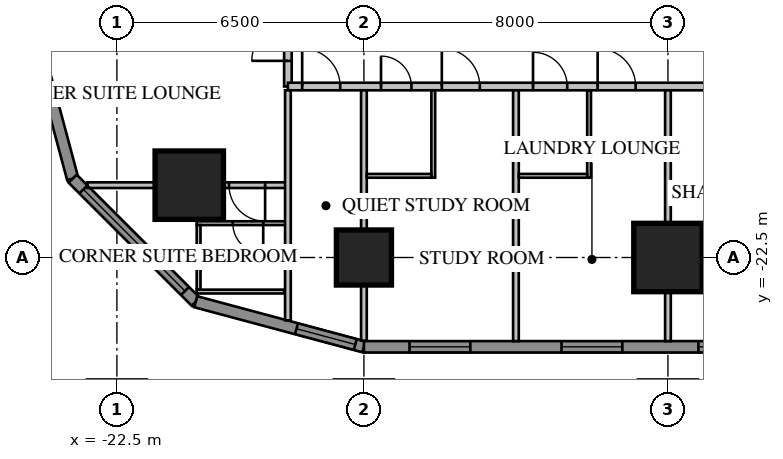
"""IFC4 building model, lengths in metres.
Left out: names, types, materials, properties, quantities, classifications, styles, units other than length and angle.
Written with IfcOpenShell. Run it as: python <this file> out.ifc"""

import sys

from ifc_helpers import new_model, si_unit, direction, frame, frame_2d, origin, origin_2d, place, context, subcontext, project, spatial, rectangle, extrude, element, fill, save


model = new_model("IFC4")
c1 = context("Model", 3, precision=1e-05, world=origin(), true_north=direction((0.0, 1.0)))
c2 = subcontext(c1, "Body", "Model", "MODEL_VIEW")
j1 = project(units=[si_unit("LENGTHUNIT", "METRE"), si_unit("PLANEANGLEUNIT", "RADIAN")], contexts=[c1])
p1 = place(None, origin())
s1 = spatial("IfcSite", under=j1, at=p1, CompositionType="ELEMENT")
p2 = place(p1, origin())
s2 = spatial("IfcBuilding", under=s1, at=p2, CompositionType="ELEMENT")
p3 = place(p2, frame((0.0, 0.0, 35.25)))
s3 = spatial("IfcBuildingStorey", under=s2, at=p3, CompositionType="ELEMENT", Elevation=35.25)
p4 = place(p3, frame((-20.596, -20.596, 0.0), z_axis=(0.0, 0.0, 1.0), x_axis=(1.0, 0.0, 0.0)))
e1 = element("IfcColumn", 1, at=p4, inside=s3, PredefinedType="COLUMN", context=c2, shape_type="SweptSolid", body=[
    extrude(rectangle(XDim=1.8, YDim=1.8, at=origin_2d()), origin(), (0.0, 0.0, 1.0), 3.85),
])
p5 = place(p3, frame((-16.0, -22.5, 0.0), z_axis=(0.0, 0.0, 1.0), x_axis=(1.0, 0.0, 0.0)))
e2 = element("IfcColumn", 2, at=p5, inside=s3, PredefinedType="COLUMN", context=c2, shape_type="SweptSolid", body=[
    extrude(rectangle(XDim=1.45, YDim=1.45, at=origin_2d()), origin(), (0.0, 0.0, 1.0), 3.85),
])
p6 = place(p3, frame((-8.0, -22.5, 0.0), z_axis=(0.0, 0.0, 1.0), x_axis=(1.0, 0.0, 0.0)))
e3 = element("IfcColumn", 3, at=p6, inside=s3, PredefinedType="COLUMN", context=c2, shape_type="SweptSolid", body=[
    extrude(rectangle(XDim=1.8, YDim=1.8, at=origin_2d()), origin(), (0.0, 0.0, 1.0), 3.85),
])
p7 = place(p3, frame((-24.85, -16.0, 0.0), z_axis=(0.0, 0.0, 1.0), x_axis=(0.258839972501, -0.965920218567, 0.0)))
e4 = element("IfcWall", 4, at=p7, inside=s3, PredefinedType="SOLIDWALL", context=c2, shape_type="SweptSolid", body=[
    extrude(rectangle(XDim=4.581, YDim=0.3, at=frame_2d((2.291, 0.0))), origin(), (0.0, 0.0, 1.0), 3.65),
])
p8 = place(p3, frame((-23.664, -20.425, 0.0), z_axis=(0.0, 0.0, 1.0), x_axis=(0.707106781187, -0.707106781187, 0.0)))
e5 = element("IfcWall", 5, at=p8, inside=s3, PredefinedType="SOLIDWALL", context=c2, shape_type="SweptSolid", body=[
    extrude(rectangle(XDim=4.581, YDim=0.3, at=frame_2d((2.291, 0.0))), origin(), (0.0, 0.0, 1.0), 3.65),
])
p9 = place(p8, frame((0.4, 0.0, 0.75)))
e6 = element("IfcOpeningElement", 6, at=p9, cuts=e5, PredefinedType="OPENING", context=c2, shape_type="SweptSolid", body=[
    extrude(rectangle(XDim=3.781, YDim=1.8, at=frame_2d((1.891, 0.9))), frame((0.0, 0.17, 0.0), z_axis=(0.0, -1.0, 0.0), x_axis=(1.0, 0.0, 0.0)), (0.0, 0.0, 1.0), 0.34),
])
p10 = place(p3, frame((-20.425, -23.664, 0.0), z_axis=(0.0, 0.0, 1.0), x_axis=(0.965920218567, -0.258839972501, 0.0)))
e7 = element("IfcWall", 7, at=p10, inside=s3, PredefinedType="SOLIDWALL", context=c2, shape_type="SweptSolid", body=[
    extrude(rectangle(XDim=4.581, YDim=0.3, at=frame_2d((2.291, 0.0))), origin(), (0.0, 0.0, 1.0), 3.65),
])
p11 = place(p10, frame((2.746, 0.0, 0.75)))
e8 = element("IfcOpeningElement", 8, at=p11, cuts=e7, PredefinedType="OPENING", context=c2, shape_type="SweptSolid", body=[
    extrude(rectangle(XDim=1.6, YDim=1.8, at=frame_2d((0.8, 0.9))), frame((0.0, 0.17, 0.0), z_axis=(0.0, -1.0, 0.0), x_axis=(1.0, 0.0, 0.0)), (0.0, 0.0, 1.0), 0.34),
])
p12 = place(p3, frame((-16.0, -24.85, 0.0), z_axis=(0.0, 0.0, 1.0), x_axis=(1.0, 0.0, 0.0)))
e9 = element("IfcWall", 9, at=p12, inside=s3, PredefinedType="SOLIDWALL", context=c2, shape_type="SweptSolid", body=[
    extrude(rectangle(XDim=32.0, YDim=0.3, at=frame_2d((16.0, 0.0))), origin(), (0.0, 0.0, 1.0), 3.65),
])
p13 = place(p12, frame((1.2, 0.0, 0.75)))
e10 = element("IfcOpeningElement", 10, at=p13, cuts=e9, PredefinedType="OPENING", context=c2, shape_type="SweptSolid", body=[
    extrude(rectangle(XDim=1.6, YDim=1.8, at=frame_2d((0.8, 0.9))), frame((0.0, 0.17, 0.0), z_axis=(0.0, -1.0, 0.0), x_axis=(1.0, 0.0, 0.0)), (0.0, 0.0, 1.0), 0.34),
])
p14 = place(p12, frame((5.2, 0.0, 0.75)))
e11 = element("IfcOpeningElement", 11, at=p14, cuts=e9, PredefinedType="OPENING", context=c2, shape_type="SweptSolid", body=[
    extrude(rectangle(XDim=1.6, YDim=1.8, at=frame_2d((0.8, 0.9))), frame((0.0, 0.17, 0.0), z_axis=(0.0, -1.0, 0.0), x_axis=(1.0, 0.0, 0.0)), (0.0, 0.0, 1.0), 0.34),
])
p15 = place(p12, frame((17.2, 0.0, 0.75)))
e12 = element("IfcOpeningElement", 12, at=p15, cuts=e9, PredefinedType="OPENING", context=c2, shape_type="SweptSolid", body=[
    extrude(rectangle(XDim=1.6, YDim=1.8, at=frame_2d((0.8, 0.9))), frame((0.0, 0.17, 0.0), z_axis=(0.0, -1.0, 0.0), x_axis=(1.0, 0.0, 0.0)), (0.0, 0.0, 1.0), 0.34),
])
p16 = place(p12, frame((21.2, 0.0, 0.75)))
e13 = element("IfcOpeningElement", 13, at=p16, cuts=e9, PredefinedType="OPENING", context=c2, shape_type="SweptSolid", body=[
    extrude(rectangle(XDim=1.6, YDim=1.8, at=frame_2d((0.8, 0.9))), frame((0.0, 0.17, 0.0), z_axis=(0.0, -1.0, 0.0), x_axis=(1.0, 0.0, 0.0)), (0.0, 0.0, 1.0), 0.34),
])
p17 = place(p12, frame((25.2, 0.0, 0.75)))
e14 = element("IfcOpeningElement", 14, at=p17, cuts=e9, PredefinedType="OPENING", context=c2, shape_type="SweptSolid", body=[
    extrude(rectangle(XDim=1.6, YDim=1.8, at=frame_2d((0.8, 0.9))), frame((0.0, 0.17, 0.0), z_axis=(0.0, -1.0, 0.0), x_axis=(1.0, 0.0, 0.0)), (0.0, 0.0, 1.0), 0.34),
])
p18 = place(p12, frame((29.2, 0.0, 0.75)))
e15 = element("IfcOpeningElement", 15, at=p18, cuts=e9, PredefinedType="OPENING", context=c2, shape_type="SweptSolid", body=[
    extrude(rectangle(XDim=1.6, YDim=1.8, at=frame_2d((0.8, 0.9))), frame((0.0, 0.17, 0.0), z_axis=(0.0, -1.0, 0.0), x_axis=(1.0, 0.0, 0.0)), (0.0, 0.0, 1.0), 0.34),
])
p19 = place(p12, frame((8.8, 0.0, 0.75)))
e16 = element("IfcOpeningElement", 16, at=p19, cuts=e9, PredefinedType="OPENING", context=c2, shape_type="SweptSolid", body=[
    extrude(rectangle(XDim=2.4, YDim=1.8, at=frame_2d((1.2, 0.9))), frame((0.0, 0.17, 0.0), z_axis=(0.0, -1.0, 0.0), x_axis=(1.0, 0.0, 0.0)), (0.0, 0.0, 1.0), 0.34),
])
p20 = place(p12, frame((13.812, 0.0, 0.0)))
e17 = element("IfcOpeningElement", 17, at=p20, cuts=e9, PredefinedType="OPENING", context=c2, shape_type="SweptSolid", body=[
    extrude(rectangle(XDim=1.0, YDim=2.4, at=frame_2d((0.5, 1.2))), frame((0.0, 0.17, 0.0), z_axis=(0.0, -1.0, 0.0), x_axis=(1.0, 0.0, 0.0)), (0.0, 0.0, 1.0), 0.34),
])
p21 = place(p3, frame((-18.0, 18.0, 0.0), z_axis=(0.0, 0.0, 1.0), x_axis=(0.0, -1.0, 0.0)))
e18 = element("IfcWall", 18, at=p21, inside=s3, PredefinedType="PARTITIONING", context=c2, shape_type="SweptSolid", body=[
    extrude(rectangle(XDim=36.0, YDim=0.2, at=frame_2d((18.0, 0.0))), origin(), (0.0, 0.0, 1.0), 3.65),
])
p22 = place(p21, frame((10.4, 0.0, 0.0)))
e19 = element("IfcOpeningElement", 19, at=p22, cuts=e18, PredefinedType="OPENING", context=c2, shape_type="SweptSolid", body=[
    extrude(rectangle(XDim=1.0, YDim=2.1, at=frame_2d((0.5, 1.05))), frame((0.0, 0.12, 0.0), z_axis=(0.0, -1.0, 0.0), x_axis=(1.0, 0.0, 0.0)), (0.0, 0.0, 1.0), 0.24),
])
p23 = place(p21, frame((0.375, 0.0, 0.0)))
e20 = element("IfcOpeningElement", 20, at=p23, cuts=e18, PredefinedType="OPENING", context=c2, shape_type="SweptSolid", body=[
    extrude(rectangle(XDim=1.0, YDim=2.1, at=frame_2d((0.5, 1.05))), frame((0.0, 0.12, 0.0), z_axis=(0.0, -1.0, 0.0), x_axis=(1.0, 0.0, 0.0)), (0.0, 0.0, 1.0), 0.24),
])
p24 = place(p21, frame((34.375, 0.0, 0.0)))
e21 = element("IfcOpeningElement", 21, at=p24, cuts=e18, PredefinedType="OPENING", context=c2, shape_type="SweptSolid", body=[
    extrude(rectangle(XDim=0.95, YDim=2.1, at=frame_2d((0.475, 1.05))), frame((0.0, 0.12, 0.0), z_axis=(0.0, -1.0, 0.0), x_axis=(1.0, 0.0, 0.0)), (0.0, 0.0, 1.0), 0.24),
])
p25 = place(p3, frame((-18.065, -21.596, 0.0), z_axis=(0.0, 0.0, 1.0), x_axis=(-1.0, 0.0, 0.0)))
e22 = element("IfcWall", 22, at=p25, inside=s3, PredefinedType="PARTITIONING", context=c2, shape_type="SweptSolid", body=[
    extrude(rectangle(XDim=2.335, YDim=0.1, at=frame_2d((1.167, 0.0))), origin(), (0.0, 0.0, 1.0), 3.65),
])
p26 = place(p25, frame((0.585, 0.0, 0.0)))
e23 = element("IfcOpeningElement", 23, at=p26, cuts=e22, PredefinedType="OPENING", context=c2, shape_type="SweptSolid", body=[
    extrude(rectangle(XDim=0.8, YDim=2.1, at=frame_2d((0.4, 1.05))), frame((0.0, 0.07, 0.0), z_axis=(0.0, -1.0, 0.0), x_axis=(1.0, 0.0, 0.0)), (0.0, 0.0, 1.0), 0.14),
])
p27 = place(p3, frame((-20.35, -21.646, 0.0), z_axis=(0.0, 0.0, 1.0), x_axis=(0.0, -1.0, 0.0)))
e24 = element("IfcWall", 24, at=p27, inside=s3, PredefinedType="PARTITIONING", context=c2, shape_type="SweptSolid", body=[
    extrude(rectangle(XDim=1.7, YDim=0.1, at=frame_2d((0.85, 0.0))), origin(), (0.0, 0.0, 1.0), 3.65),
])
p28 = place(p3, frame((-18.1, -23.396, 0.0), z_axis=(0.0, 0.0, 1.0), x_axis=(-1.0, 0.0, 0.0)))
e25 = element("IfcWall", 25, at=p28, inside=s3, PredefinedType="PARTITIONING", context=c2, shape_type="SweptSolid", body=[
    extrude(rectangle(XDim=2.3, YDim=0.1, at=frame_2d((1.15, 0.0))), origin(), (0.0, 0.0, 1.0), 3.65),
])
p29 = place(p3, frame((-18.065, -20.596, 0.0), z_axis=(0.0, 0.0, 1.0), x_axis=(-1.0, 0.0, 0.0)))
e26 = element("IfcWall", 26, at=p29, inside=s3, PredefinedType="PARTITIONING", context=c2, shape_type="SweptSolid", body=[
    extrude(rectangle(XDim=5.209, YDim=0.15, at=frame_2d((2.604, 0.0))), origin(), (0.0, 0.0, 1.0), 3.65),
])
p30 = place(p29, frame((0.535, 0.0, 0.0)))
e27 = element("IfcOpeningElement", 27, at=p30, cuts=e26, PredefinedType="OPENING", context=c2, shape_type="SweptSolid", body=[
    extrude(rectangle(XDim=0.95, YDim=2.1, at=frame_2d((0.475, 1.05))), frame((0.0, 0.095, 0.0), z_axis=(0.0, -1.0, 0.0), x_axis=(1.0, 0.0, 0.0)), (0.0, 0.0, 1.0), 0.19),
])
p31 = place(p3, frame((-18.0, -18.0, 0.0), z_axis=(0.0, 0.0, 1.0), x_axis=(1.0, 0.0, 0.0)))
e28 = element("IfcWall", 28, at=p31, inside=s3, PredefinedType="PARTITIONING", context=c2, shape_type="SweptSolid", body=[
    extrude(rectangle(XDim=36.0, YDim=0.2, at=frame_2d((18.0, 0.0))), origin(), (0.0, 0.0, 1.0), 3.65),
])
p32 = place(p31, frame((0.375, 0.0, 0.0)))
e29 = element("IfcOpeningElement", 29, at=p32, cuts=e28, PredefinedType="OPENING", context=c2, shape_type="SweptSolid", body=[
    extrude(rectangle(XDim=1.0, YDim=2.1, at=frame_2d((0.5, 1.05))), frame((0.0, 0.12, 0.0), z_axis=(0.0, -1.0, 0.0), x_axis=(1.0, 0.0, 0.0)), (0.0, 0.0, 1.0), 0.24),
])
p33 = place(p31, frame((2.45, 0.0, 0.0)))
e30 = element("IfcOpeningElement", 30, at=p33, cuts=e28, PredefinedType="OPENING", context=c2, shape_type="SweptSolid", body=[
    extrude(rectangle(XDim=0.8, YDim=2.1, at=frame_2d((0.4, 1.05))), frame((0.0, 0.12, 0.0), z_axis=(0.0, -1.0, 0.0), x_axis=(1.0, 0.0, 0.0)), (0.0, 0.0, 1.0), 0.24),
])
p34 = place(p31, frame((4.05, 0.0, 0.0)))
e31 = element("IfcOpeningElement", 31, at=p34, cuts=e28, PredefinedType="OPENING", context=c2, shape_type="SweptSolid", body=[
    extrude(rectangle(XDim=1.0, YDim=2.1, at=frame_2d((0.5, 1.05))), frame((0.0, 0.12, 0.0), z_axis=(0.0, -1.0, 0.0), x_axis=(1.0, 0.0, 0.0)), (0.0, 0.0, 1.0), 0.24),
])
p35 = place(p31, frame((6.45, 0.0, 0.0)))
e32 = element("IfcOpeningElement", 32, at=p35, cuts=e28, PredefinedType="OPENING", context=c2, shape_type="SweptSolid", body=[
    extrude(rectangle(XDim=0.9, YDim=2.1, at=frame_2d((0.45, 1.05))), frame((0.0, 0.12, 0.0), z_axis=(0.0, -1.0, 0.0), x_axis=(1.0, 0.0, 0.0)), (0.0, 0.0, 1.0), 0.24),
])
p36 = place(p31, frame((8.15, 0.0, 0.0)))
e33 = element("IfcOpeningElement", 33, at=p36, cuts=e28, PredefinedType="OPENING", context=c2, shape_type="SweptSolid", body=[
    extrude(rectangle(XDim=1.0, YDim=2.1, at=frame_2d((0.5, 1.05))), frame((0.0, 0.12, 0.0), z_axis=(0.0, -1.0, 0.0), x_axis=(1.0, 0.0, 0.0)), (0.0, 0.0, 1.0), 0.24),
])
p37 = place(p31, frame((18.375, 0.0, 0.0)))
e34 = element("IfcOpeningElement", 34, at=p37, cuts=e28, PredefinedType="OPENING", context=c2, shape_type="SweptSolid", body=[
    extrude(rectangle(XDim=0.95, YDim=2.1, at=frame_2d((0.475, 1.05))), frame((0.0, 0.12, 0.0), z_axis=(0.0, -1.0, 0.0), x_axis=(1.0, 0.0, 0.0)), (0.0, 0.0, 1.0), 0.24),
])
p38 = place(p31, frame((24.25, 0.0, 0.0)))
e35 = element("IfcOpeningElement", 35, at=p38, cuts=e28, PredefinedType="OPENING", context=c2, shape_type="SweptSolid", body=[
    extrude(rectangle(XDim=0.95, YDim=2.1, at=frame_2d((0.475, 1.05))), frame((0.0, 0.12, 0.0), z_axis=(0.0, -1.0, 0.0), x_axis=(1.0, 0.0, 0.0)), (0.0, 0.0, 1.0), 0.24),
])
p39 = place(p31, frame((26.375, 0.0, 0.0)))
e36 = element("IfcOpeningElement", 36, at=p39, cuts=e28, PredefinedType="OPENING", context=c2, shape_type="SweptSolid", body=[
    extrude(rectangle(XDim=0.95, YDim=2.1, at=frame_2d((0.475, 1.05))), frame((0.0, 0.12, 0.0), z_axis=(0.0, -1.0, 0.0), x_axis=(1.0, 0.0, 0.0)), (0.0, 0.0, 1.0), 0.24),
])
p40 = place(p31, frame((32.25, 0.0, 0.0)))
e37 = element("IfcOpeningElement", 37, at=p40, cuts=e28, PredefinedType="OPENING", context=c2, shape_type="SweptSolid", body=[
    extrude(rectangle(XDim=0.95, YDim=2.1, at=frame_2d((0.475, 1.05))), frame((0.0, 0.12, 0.0), z_axis=(0.0, -1.0, 0.0), x_axis=(1.0, 0.0, 0.0)), (0.0, 0.0, 1.0), 0.24),
])
p41 = place(p31, frame((34.375, 0.0, 0.0)))
e38 = element("IfcOpeningElement", 38, at=p41, cuts=e28, PredefinedType="OPENING", context=c2, shape_type="SweptSolid", body=[
    extrude(rectangle(XDim=0.95, YDim=2.1, at=frame_2d((0.475, 1.05))), frame((0.0, 0.12, 0.0), z_axis=(0.0, -1.0, 0.0), x_axis=(1.0, 0.0, 0.0)), (0.0, 0.0, 1.0), 0.24),
])
p42 = place(p31, frame((11.2, 0.0, 0.0)))
e39 = element("IfcOpeningElement", 39, at=p42, cuts=e28, PredefinedType="OPENING", context=c2, shape_type="SweptSolid", body=[
    extrude(rectangle(XDim=1.0, YDim=2.1, at=frame_2d((0.5, 1.05))), frame((0.0, 0.12, 0.0), z_axis=(0.0, -1.0, 0.0), x_axis=(1.0, 0.0, 0.0)), (0.0, 0.0, 1.0), 0.24),
])
p43 = place(p3, frame((-18.0, -18.1, 0.0), z_axis=(0.0, 0.0, 1.0), x_axis=(0.0, -1.0, 0.0)))
e40 = element("IfcWall", 40, at=p43, inside=s3, PredefinedType="PARTITIONING", context=c2, shape_type="SweptSolid", body=[
    extrude(rectangle(XDim=6.053, YDim=0.15, at=frame_2d((3.027, 0.0))), origin(), (0.0, 0.0, 1.0), 3.65),
])
p44 = place(p3, frame((-16.0, -18.1, 0.0), z_axis=(0.0, 0.0, 1.0), x_axis=(0.0, -1.0, 0.0)))
e41 = element("IfcWall", 41, at=p44, inside=s3, PredefinedType="PARTITIONING", context=c2, shape_type="SweptSolid", body=[
    extrude(rectangle(XDim=6.589, YDim=0.15, at=frame_2d((3.295, 0.0))), origin(), (0.0, 0.0, 1.0), 3.65),
])
for number, where, z_axis, x_axis in (
    (42, (-12.0, -18.1, 0.0), (0.0, 0.0, 1.0), (0.0, -1.0, 0.0)),
    (43, (-8.0, -18.1, 0.0), (0.0, 0.0, 1.0), (0.0, -1.0, 0.0)),
):
    element("IfcWall", number, at=place(p3, frame(where, z_axis=z_axis, x_axis=x_axis)), inside=s3, PredefinedType="PARTITIONING", context=c2, shape_type="SweptSolid", body=[
        extrude(rectangle(XDim=6.6, YDim=0.15, at=frame_2d((3.3, 0.0))), origin(), (0.0, 0.0, 1.0), 3.65),
    ])
p45 = place(p3, frame((-14.175, -18.1, 0.0), z_axis=(0.0, 0.0, 1.0), x_axis=(0.0, -1.0, 0.0)))
e44 = element("IfcWall", 44, at=p45, inside=s3, PredefinedType="PARTITIONING", context=c2, shape_type="SweptSolid", body=[
    extrude(rectangle(XDim=2.3, YDim=0.1, at=frame_2d((1.15, 0.0))), origin(), (0.0, 0.0, 1.0), 3.65),
])
p46 = place(p3, frame((-15.925, -20.35, 0.0), z_axis=(0.0, 0.0, 1.0), x_axis=(1.0, 0.0, 0.0)))
e45 = element("IfcWall", 45, at=p46, inside=s3, PredefinedType="PARTITIONING", context=c2, shape_type="SweptSolid", body=[
    extrude(rectangle(XDim=1.7, YDim=0.1, at=frame_2d((0.85, 0.0))), origin(), (0.0, 0.0, 1.0), 3.65),
])
p47 = place(p3, frame((-10.075, -18.1, 0.0), z_axis=(0.0, 0.0, 1.0), x_axis=(0.0, -1.0, 0.0)))
e46 = element("IfcWall", 46, at=p47, inside=s3, PredefinedType="PARTITIONING", context=c2, shape_type="SweptSolid", body=[
    extrude(rectangle(XDim=2.3, YDim=0.1, at=frame_2d((1.15, 0.0))), origin(), (0.0, 0.0, 1.0), 3.65),
])
p48 = place(p3, frame((-11.925, -20.35, 0.0), z_axis=(0.0, 0.0, 1.0), x_axis=(1.0, 0.0, 0.0)))
e47 = element("IfcWall", 47, at=p48, inside=s3, PredefinedType="PARTITIONING", context=c2, shape_type="SweptSolid", body=[
    extrude(rectangle(XDim=1.8, YDim=0.1, at=frame_2d((0.9, 0.0))), origin(), (0.0, 0.0, 1.0), 3.65),
])
p49 = place(p9, origin())
e48 = element("IfcWindow", 48, at=p49, inside=s3, PartitioningType="SINGLE_PANEL", PredefinedType="WINDOW", context=c2, shape_type="SweptSolid", body=[
    extrude(rectangle(XDim=3.781, YDim=1.8, at=frame_2d((1.891, 0.9))), frame((0.0, 0.03, 0.0), z_axis=(0.0, -1.0, 0.0), x_axis=(1.0, 0.0, 0.0)), (0.0, 0.0, 1.0), 0.06),
])
fill(e6, e48)
p50 = place(p11, origin())
e49 = element("IfcWindow", 49, at=p50, inside=s3, PartitioningType="SINGLE_PANEL", PredefinedType="WINDOW", context=c2, shape_type="SweptSolid", body=[
    extrude(rectangle(XDim=1.6, YDim=1.8, at=frame_2d((0.8, 0.9))), frame((0.0, 0.03, 0.0), z_axis=(0.0, -1.0, 0.0), x_axis=(1.0, 0.0, 0.0)), (0.0, 0.0, 1.0), 0.06),
])
fill(e8, e49)
p51 = place(p13, origin())
e50 = element("IfcWindow", 50, at=p51, inside=s3, PartitioningType="SINGLE_PANEL", PredefinedType="WINDOW", context=c2, shape_type="SweptSolid", body=[
    extrude(rectangle(XDim=1.6, YDim=1.8, at=frame_2d((0.8, 0.9))), frame((0.0, 0.03, 0.0), z_axis=(0.0, -1.0, 0.0), x_axis=(1.0, 0.0, 0.0)), (0.0, 0.0, 1.0), 0.06),
])
fill(e10, e50)
p52 = place(p14, origin())
e51 = element("IfcWindow", 51, at=p52, inside=s3, PartitioningType="SINGLE_PANEL", PredefinedType="WINDOW", context=c2, shape_type="SweptSolid", body=[
    extrude(rectangle(XDim=1.6, YDim=1.8, at=frame_2d((0.8, 0.9))), frame((0.0, 0.03, 0.0), z_axis=(0.0, -1.0, 0.0), x_axis=(1.0, 0.0, 0.0)), (0.0, 0.0, 1.0), 0.06),
])
fill(e11, e51)
p53 = place(p19, origin())
e52 = element("IfcWindow", 52, at=p53, inside=s3, PartitioningType="SINGLE_PANEL", PredefinedType="WINDOW", context=c2, shape_type="SweptSolid", body=[
    extrude(rectangle(XDim=2.4, YDim=1.8, at=frame_2d((1.2, 0.9))), frame((0.0, 0.03, 0.0), z_axis=(0.0, -1.0, 0.0), x_axis=(1.0, 0.0, 0.0)), (0.0, 0.0, 1.0), 0.06),
])
fill(e16, e52)
p54 = place(p24, origin())
e53 = element("IfcDoor", 53, at=p54, inside=s3, OperationType="SINGLE_SWING_RIGHT", PredefinedType="DOOR", context=c2, shape_type="SweptSolid", body=[
    extrude(rectangle(XDim=0.95, YDim=2.1, at=frame_2d((0.475, 1.05))), frame((0.0, 0.025, 0.0), z_axis=(0.0, -1.0, 0.0), x_axis=(1.0, 0.0, 0.0)), (0.0, 0.0, 1.0), 0.05),
])
fill(e21, e53)
p55 = place(p26, origin())
e54 = element("IfcDoor", 54, at=p55, inside=s3, OperationType="SINGLE_SWING_LEFT", PredefinedType="DOOR", context=c2, shape_type="SweptSolid", body=[
    extrude(rectangle(XDim=0.8, YDim=2.1, at=frame_2d((0.4, 1.05))), frame((0.0, 0.025, 0.0), z_axis=(0.0, -1.0, 0.0), x_axis=(1.0, 0.0, 0.0)), (0.0, 0.0, 1.0), 0.05),
])
fill(e23, e54)
p56 = place(p30, origin())
e55 = element("IfcDoor", 55, at=p56, inside=s3, OperationType="SINGLE_SWING_LEFT", PredefinedType="DOOR", context=c2, shape_type="SweptSolid", body=[
    extrude(rectangle(XDim=0.95, YDim=2.1, at=frame_2d((0.475, 1.05))), frame((0.0, 0.025, 0.0), z_axis=(0.0, -1.0, 0.0), x_axis=(1.0, 0.0, 0.0)), (0.0, 0.0, 1.0), 0.05),
])
fill(e27, e55)
p57 = place(p32, origin())
e56 = element("IfcDoor", 56, at=p57, inside=s3, OperationType="SINGLE_SWING_LEFT", PredefinedType="DOOR", context=c2, shape_type="SweptSolid", body=[
    extrude(rectangle(XDim=1.0, YDim=2.1, at=frame_2d((0.5, 1.05))), frame((0.0, 0.025, 0.0), z_axis=(0.0, -1.0, 0.0), x_axis=(1.0, 0.0, 0.0)), (0.0, 0.0, 1.0), 0.05),
])
fill(e29, e56)
p58 = place(p33, origin())
e57 = element("IfcDoor", 57, at=p58, inside=s3, OperationType="SINGLE_SWING_LEFT", PredefinedType="DOOR", context=c2, shape_type="SweptSolid", body=[
    extrude(rectangle(XDim=0.8, YDim=2.1, at=frame_2d((0.4, 1.05))), frame((0.0, 0.025, 0.0), z_axis=(0.0, -1.0, 0.0), x_axis=(1.0, 0.0, 0.0)), (0.0, 0.0, 1.0), 0.05),
])
fill(e30, e57)
p59 = place(p34, origin())
e58 = element("IfcDoor", 58, at=p59, inside=s3, OperationType="SINGLE_SWING_LEFT", PredefinedType="DOOR", context=c2, shape_type="SweptSolid", body=[
    extrude(rectangle(XDim=1.0, YDim=2.1, at=frame_2d((0.5, 1.05))), frame((0.0, 0.025, 0.0), z_axis=(0.0, -1.0, 0.0), x_axis=(1.0, 0.0, 0.0)), (0.0, 0.0, 1.0), 0.05),
])
fill(e31, e58)
p60 = place(p35, origin())
e59 = element("IfcDoor", 59, at=p60, inside=s3, OperationType="SINGLE_SWING_LEFT", PredefinedType="DOOR", context=c2, shape_type="SweptSolid", body=[
    extrude(rectangle(XDim=0.9, YDim=2.1, at=frame_2d((0.45, 1.05))), frame((0.0, 0.025, 0.0), z_axis=(0.0, -1.0, 0.0), x_axis=(1.0, 0.0, 0.0)), (0.0, 0.0, 1.0), 0.05),
])
fill(e32, e59)
p61 = place(p36, origin())
e60 = element("IfcDoor", 60, at=p61, inside=s3, OperationType="SINGLE_SWING_LEFT", PredefinedType="DOOR", context=c2, shape_type="SweptSolid", body=[
    extrude(rectangle(XDim=1.0, YDim=2.1, at=frame_2d((0.5, 1.05))), frame((0.0, 0.025, 0.0), z_axis=(0.0, -1.0, 0.0), x_axis=(1.0, 0.0, 0.0)), (0.0, 0.0, 1.0), 0.05),
])
fill(e33, e60)
save(model, sys.argv[1])
